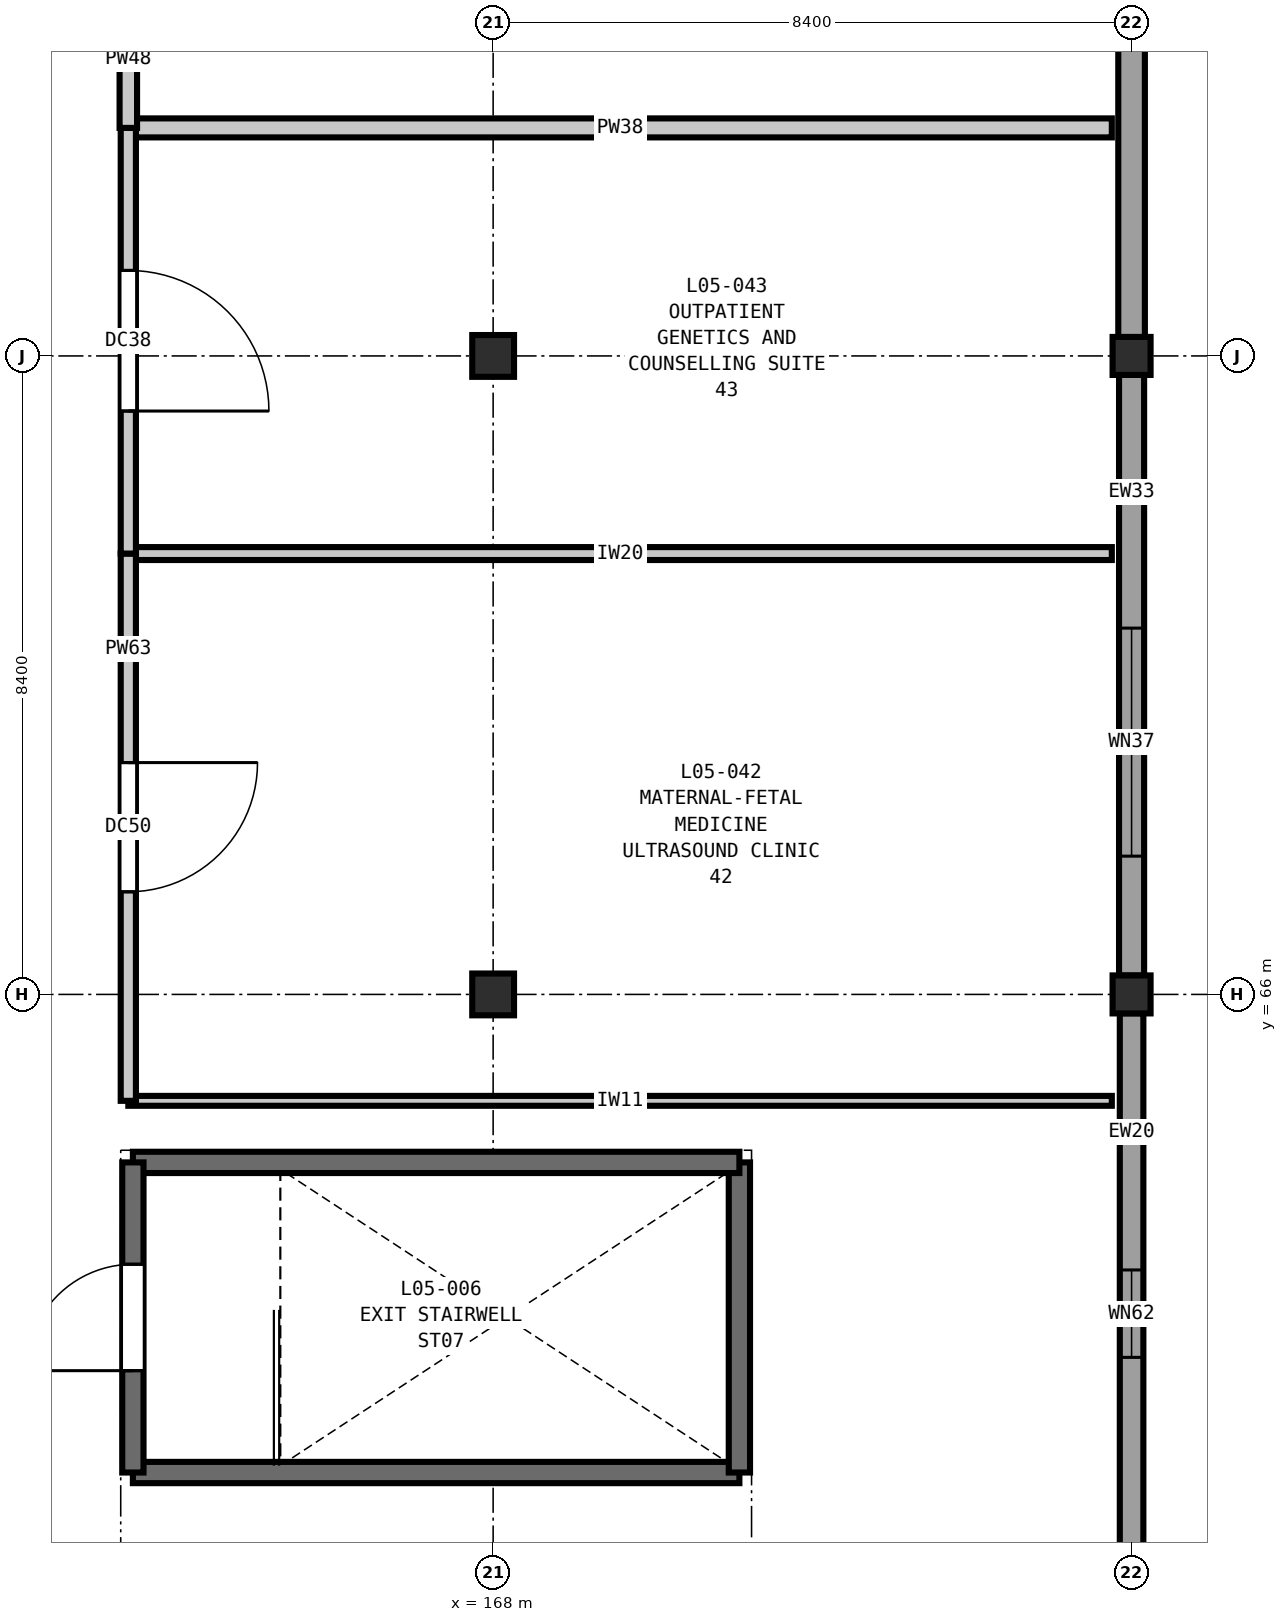
"""IFC4 building model, lengths in metres.
Left out: names, types, materials, properties, quantities, classifications, styles, units other than length and angle.
Written with IfcOpenShell. Run it as: python <this file> out.ifc"""

import sys

from ifc_helpers import new_model, si_unit, direction, frame, frame_2d, origin, origin_2d, place, context, subcontext, project, spatial, rectangle, extrude, element, fill, save


model = new_model("IFC4")
c1 = context("Model", 3, precision=1e-05, world=origin(), true_north=direction((0.0, 1.0)))
c2 = subcontext(c1, "Body", "Model", "MODEL_VIEW")
j1 = project(units=[si_unit("LENGTHUNIT", "METRE"), si_unit("PLANEANGLEUNIT", "RADIAN")], contexts=[c1])
p1 = place(None, origin())
s1 = spatial("IfcSite", under=j1, at=p1, CompositionType="ELEMENT")
p2 = place(p1, origin())
s2 = spatial("IfcBuilding", under=s1, at=p2, CompositionType="ELEMENT")
p3 = place(p2, frame((0.0, 0.0, 24.6)))
s3 = spatial("IfcBuildingStorey", under=s2, at=p3, CompositionType="ELEMENT", Elevation=24.6)
for number, where, z_axis, x_axis in (
    (1, (168.0, 66.0, 0.0), (0.0, 0.0, 1.0), (1.0, 0.0, 0.0)),
    (2, (168.0, 74.4, 0.0), (0.0, 0.0, 1.0), (1.0, 0.0, 0.0)),
):
    element("IfcColumn", number, at=place(p3, frame(where, z_axis=z_axis, x_axis=x_axis)), inside=s3, PredefinedType="COLUMN", context=c2, shape_type="SweptSolid", body=[
        extrude(rectangle(XDim=0.55, YDim=0.55, at=origin_2d()), origin(), (0.0, 0.0, 1.0), 4.2),
    ])
for number, where, z_axis, x_axis in (
    (3, (176.4, 66.0, 0.0), (0.0, 0.0, 1.0), (1.0, 0.0, 0.0)),
    (4, (176.4, 74.4, 0.0), (0.0, 0.0, 1.0), (1.0, 0.0, 0.0)),
):
    element("IfcColumn", number, at=place(p3, frame(where, z_axis=z_axis, x_axis=x_axis)), inside=s3, PredefinedType="COLUMN", context=c2, shape_type="SweptSolid", body=[
        extrude(rectangle(XDim=0.5, YDim=0.5, at=origin_2d()), origin(), (0.0, 0.0, 1.0), 4.2),
    ])
p4 = place(p3, frame((176.4, 82.552, 0.0), z_axis=(0.0, 0.0, 1.0), x_axis=(0.0, -1.0, 0.0)))
e5 = element("IfcWall", 5, at=p4, inside=s3, PredefinedType="SOLIDWALL", context=c2, shape_type="SweptSolid", body=[
    extrude(rectangle(XDim=7.904, YDim=0.35, at=frame_2d((3.952, 0.0))), origin(), (0.0, 0.0, 1.0), 3.48),
])
p5 = place(p3, frame((176.4, 74.152, 0.0), z_axis=(0.0, 0.0, 1.0), x_axis=(0.0, -1.0, 0.0)))
e6 = element("IfcWall", 6, at=p5, inside=s3, PredefinedType="SOLIDWALL", context=c2, shape_type="SweptSolid", body=[
    extrude(rectangle(XDim=7.904, YDim=0.33, at=frame_2d((3.952, 0.0))), origin(), (0.0, 0.0, 1.0), 3.48),
])
p6 = place(p5, frame((3.333, 0.0, 0.9)))
e7 = element("IfcOpeningElement", 7, at=p6, cuts=e6, PredefinedType="OPENING", context=c2, shape_type="SweptSolid", body=[
    extrude(rectangle(XDim=3.0, YDim=2.15, at=frame_2d((1.5, 1.075))), frame((0.0, 0.175, 0.0), z_axis=(0.0, -1.0, 0.0), x_axis=(1.0, 0.0, 0.0)), (0.0, 0.0, 1.0), 0.35),
])
p7 = place(p3, frame((176.4, 65.752, 0.0), z_axis=(0.0, 0.0, 1.0), x_axis=(0.0, -1.0, 0.0)))
e8 = element("IfcWall", 8, at=p7, inside=s3, PredefinedType="SOLIDWALL", context=c2, shape_type="SweptSolid", body=[
    extrude(rectangle(XDim=7.904, YDim=0.31, at=frame_2d((3.952, 0.0))), origin(), (0.0, 0.0, 1.0), 3.48),
])
p8 = place(p7, frame((3.377, 0.0, 0.9)))
e9 = element("IfcOpeningElement", 9, at=p8, cuts=e8, PredefinedType="OPENING", context=c2, shape_type="SweptSolid", body=[
    extrude(rectangle(XDim=1.15, YDim=1.4, at=frame_2d((0.575, 0.7))), frame((0.0, 0.165, 0.0), z_axis=(0.0, -1.0, 0.0), x_axis=(1.0, 0.0, 0.0)), (0.0, 0.0, 1.0), 0.33),
])
p9 = place(p3, frame((163.26, 59.71, 0.0), z_axis=(0.0, 0.0, 1.0), x_axis=(1.0, 0.0, 0.0)))
e10 = element("IfcWall", 10, at=p9, inside=s3, PredefinedType="SHEAR", context=c2, shape_type="SweptSolid", body=[
    extrude(rectangle(XDim=7.98, YDim=0.28, at=frame_2d((3.99, 0.0))), origin(), (0.0, 0.0, 1.0), 4.2),
])
p10 = place(p3, frame((171.24, 59.71, 0.0), z_axis=(0.0, 0.0, 1.0), x_axis=(0.0, 1.0, 0.0)))
e11 = element("IfcWall", 11, at=p10, inside=s3, PredefinedType="SHEAR", context=c2, shape_type="SweptSolid", body=[
    extrude(rectangle(XDim=4.08, YDim=0.28, at=frame_2d((2.04, 0.0))), origin(), (0.0, 0.0, 1.0), 4.2),
])
p11 = place(p3, frame((171.24, 63.79, 0.0), z_axis=(0.0, 0.0, 1.0), x_axis=(-1.0, 0.0, 0.0)))
e12 = element("IfcWall", 12, at=p11, inside=s3, PredefinedType="SHEAR", context=c2, shape_type="SweptSolid", body=[
    extrude(rectangle(XDim=7.98, YDim=0.28, at=frame_2d((3.99, 0.0))), origin(), (0.0, 0.0, 1.0), 4.2),
])
p12 = place(p3, frame((163.26, 63.79, 0.0), z_axis=(0.0, 0.0, 1.0), x_axis=(0.0, -1.0, 0.0)))
e13 = element("IfcWall", 13, at=p12, inside=s3, PredefinedType="SHEAR", context=c2, shape_type="SweptSolid", body=[
    extrude(rectangle(XDim=4.08, YDim=0.28, at=frame_2d((2.04, 0.0))), origin(), (0.0, 0.0, 1.0), 4.2),
])
p13 = place(p12, frame((1.34, 0.0, 0.0)))
e14 = element("IfcOpeningElement", 14, at=p13, cuts=e13, PredefinedType="OPENING", context=c2, shape_type="SweptSolid", body=[
    extrude(rectangle(XDim=1.4, YDim=2.2, at=frame_2d((0.7, 1.1))), frame((0.0, 0.15, 0.0), z_axis=(0.0, -1.0, 0.0), x_axis=(1.0, 0.0, 0.0)), (0.0, 0.0, 1.0), 0.3),
])
p14 = place(p3, frame((163.2, 64.6, 0.0), z_axis=(0.0, 0.0, 1.0), x_axis=(1.0, 0.0, 0.0)))
e15 = element("IfcWall", 15, at=p14, inside=s3, PredefinedType="PARTITIONING", context=c2, shape_type="SweptSolid", body=[
    extrude(rectangle(XDim=12.94, YDim=0.13, at=frame_2d((6.47, 0.0))), origin(), (0.0, 0.0, 1.0), 3.92),
])
p15 = place(p3, frame((163.2, 71.8, 0.0), z_axis=(0.0, 0.0, 1.0), x_axis=(1.0, 0.0, 0.0)))
e16 = element("IfcWall", 16, at=p15, inside=s3, PredefinedType="PARTITIONING", context=c2, shape_type="SweptSolid", body=[
    extrude(rectangle(XDim=12.94, YDim=0.17, at=frame_2d((6.47, 0.0))), origin(), (0.0, 0.0, 1.0), 3.92),
])
p16 = place(p3, frame((163.2, 77.4, 0.0), z_axis=(0.0, 0.0, 1.0), x_axis=(1.0, 0.0, 0.0)))
e17 = element("IfcWall", 17, at=p16, inside=s3, PredefinedType="PARTITIONING", context=c2, shape_type="SweptSolid", body=[
    extrude(rectangle(XDim=12.94, YDim=0.25, at=frame_2d((6.47, 0.0))), origin(), (0.0, 0.0, 1.0), 3.92),
])
p17 = place(p3, frame((163.2, 64.6, 0.0), z_axis=(0.0, 0.0, 1.0), x_axis=(0.0, 1.0, 0.0)))
e18 = element("IfcWall", 18, at=p17, inside=s3, PredefinedType="PARTITIONING", context=c2, shape_type="SweptSolid", body=[
    extrude(rectangle(XDim=7.2, YDim=0.2, at=frame_2d((3.6, 0.0))), origin(), (0.0, 0.0, 1.0), 3.92),
])
p18 = place(p17, frame((2.75, 0.0, 0.0)))
e19 = element("IfcOpeningElement", 19, at=p18, cuts=e18, PredefinedType="OPENING", context=c2, shape_type="SweptSolid", body=[
    extrude(rectangle(XDim=1.7, YDim=2.3, at=frame_2d((0.85, 1.15))), frame((0.0, 0.11, 0.0), z_axis=(0.0, -1.0, 0.0), x_axis=(1.0, 0.0, 0.0)), (0.0, 0.0, 1.0), 0.22),
])
p19 = place(p3, frame((163.2, 71.8, 0.0), z_axis=(0.0, 0.0, 1.0), x_axis=(0.0, 1.0, 0.0)))
e20 = element("IfcWall", 20, at=p19, inside=s3, PredefinedType="PARTITIONING", context=c2, shape_type="SweptSolid", body=[
    extrude(rectangle(XDim=5.6, YDim=0.2, at=frame_2d((2.8, 0.0))), origin(), (0.0, 0.0, 1.0), 3.92),
])
p20 = place(p19, frame((1.875, 0.0, 0.0)))
e21 = element("IfcOpeningElement", 21, at=p20, cuts=e20, PredefinedType="OPENING", context=c2, shape_type="SweptSolid", body=[
    extrude(rectangle(XDim=1.85, YDim=2.3, at=frame_2d((0.925, 1.15))), frame((0.0, 0.11, 0.0), z_axis=(0.0, -1.0, 0.0), x_axis=(1.0, 0.0, 0.0)), (0.0, 0.0, 1.0), 0.22),
])
p21 = place(p3, frame((163.2, 77.4, 0.0), z_axis=(0.0, 0.0, 1.0), x_axis=(0.0, 1.0, 0.0)))
e22 = element("IfcWall", 22, at=p21, inside=s3, PredefinedType="PARTITIONING", context=c2, shape_type="SweptSolid", body=[
    extrude(rectangle(XDim=5.4, YDim=0.23, at=frame_2d((2.7, 0.0))), origin(), (0.0, 0.0, 1.0), 3.92),
])
p22 = place(p21, frame((2.075, 0.0, 0.0)))
e23 = element("IfcOpeningElement", 23, at=p22, cuts=e22, PredefinedType="OPENING", context=c2, shape_type="SweptSolid", body=[
    extrude(rectangle(XDim=1.25, YDim=2.15, at=frame_2d((0.625, 1.075))), frame((0.0, 0.125, 0.0), z_axis=(0.0, -1.0, 0.0), x_axis=(1.0, 0.0, 0.0)), (0.0, 0.0, 1.0), 0.25),
])
p23 = place(p6, origin())
e24 = element("IfcWindow", 24, at=p23, inside=s3, PartitioningType="DOUBLE_PANEL_VERTICAL", PredefinedType="WINDOW", context=c2, shape_type="SweptSolid", body=[
    extrude(rectangle(XDim=3.0, YDim=2.15, at=frame_2d((1.5, 1.075))), frame((0.0, 0.03, 0.0), z_axis=(0.0, -1.0, 0.0), x_axis=(1.0, 0.0, 0.0)), (0.0, 0.0, 1.0), 0.06),
])
fill(e7, e24)
p24 = place(p8, origin())
e25 = element("IfcWindow", 25, at=p24, inside=s3, PartitioningType="SINGLE_PANEL", PredefinedType="WINDOW", context=c2, shape_type="SweptSolid", body=[
    extrude(rectangle(XDim=1.15, YDim=1.4, at=frame_2d((0.575, 0.7))), frame((0.0, 0.03, 0.0), z_axis=(0.0, -1.0, 0.0), x_axis=(1.0, 0.0, 0.0)), (0.0, 0.0, 1.0), 0.06),
])
fill(e9, e25)
p25 = place(p13, frame((1.4, 0.0, 0.0), z_axis=(0.0, 0.0, 1.0), x_axis=(-1.0, 0.0, 0.0)))
e26 = element("IfcDoor", 26, at=p25, inside=s3, OperationType="SINGLE_SWING_LEFT", PredefinedType="DOOR", context=c2, shape_type="SweptSolid", body=[
    extrude(rectangle(XDim=1.4, YDim=2.2, at=frame_2d((0.7, 1.1))), frame((0.0, 0.025, 0.0), z_axis=(0.0, -1.0, 0.0), x_axis=(1.0, 0.0, 0.0)), (0.0, 0.0, 1.0), 0.05),
])
fill(e14, e26)
p26 = place(p18, frame((1.7, 0.0, 0.0), z_axis=(0.0, 0.0, 1.0), x_axis=(-1.0, 0.0, 0.0)))
e27 = element("IfcDoor", 27, at=p26, inside=s3, OperationType="SINGLE_SWING_LEFT", PredefinedType="DOOR", context=c2, shape_type="SweptSolid", body=[
    extrude(rectangle(XDim=1.7, YDim=2.3, at=frame_2d((0.85, 1.15))), frame((0.0, 0.025, 0.0), z_axis=(0.0, -1.0, 0.0), x_axis=(1.0, 0.0, 0.0)), (0.0, 0.0, 1.0), 0.05),
])
fill(e19, e27)
p27 = place(p20, frame((1.85, 0.0, 0.0), z_axis=(0.0, 0.0, 1.0), x_axis=(-1.0, 0.0, 0.0)))
e28 = element("IfcDoor", 28, at=p27, inside=s3, OperationType="SINGLE_SWING_RIGHT", PredefinedType="DOOR", context=c2, shape_type="SweptSolid", body=[
    extrude(rectangle(XDim=1.85, YDim=2.3, at=frame_2d((0.925, 1.15))), frame((0.0, 0.025, 0.0), z_axis=(0.0, -1.0, 0.0), x_axis=(1.0, 0.0, 0.0)), (0.0, 0.0, 1.0), 0.05),
])
fill(e21, e28)
save(model, sys.argv[1])
